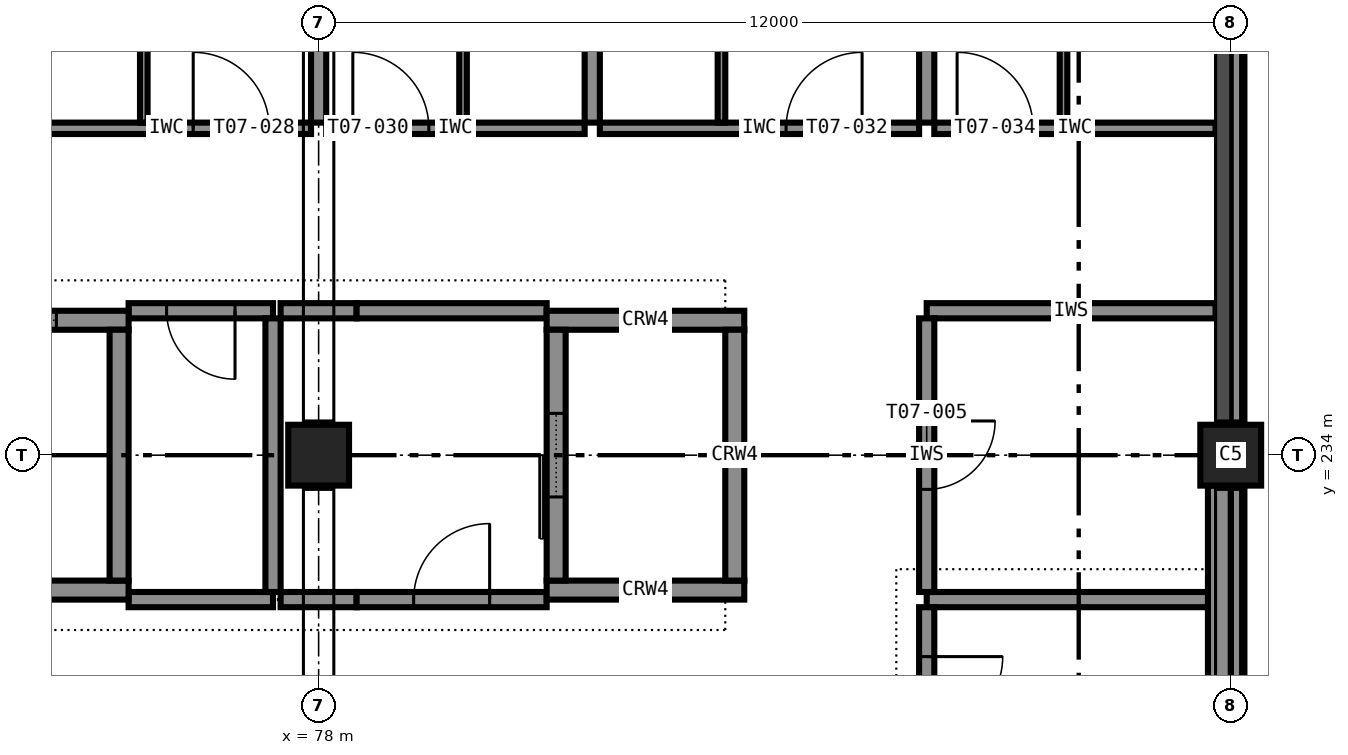
"""IFC4 building model, lengths in metres.
Left out: names, types, materials, properties, quantities, classifications, styles, units other than length and angle.
Written with IfcOpenShell. Run it as: python <this file> out.ifc"""

import sys

from ifc_helpers import new_model, si_unit, direction, frame, frame_2d, origin, origin_2d, place, context, subcontext, project, spatial, rectangle, extrude, element, fill, save


model = new_model("IFC4")
c1 = context("Model", 3, precision=1e-05, world=origin(), true_north=direction((0.0, 1.0)))
c2 = subcontext(c1, "Body", "Model", "MODEL_VIEW")
j1 = project(units=[si_unit("LENGTHUNIT", "METRE"), si_unit("PLANEANGLEUNIT", "RADIAN")], contexts=[c1])
p1 = place(None, origin())
s1 = spatial("IfcSite", under=j1, at=p1, CompositionType="ELEMENT")
p2 = place(p1, origin())
s2 = spatial("IfcBuilding", under=s1, at=p2, CompositionType="ELEMENT")
p3 = place(p2, frame((0.0, 0.0, 35.4)))
s3 = spatial("IfcBuildingStorey", under=s2, at=p3, CompositionType="ELEMENT", Elevation=35.4)
for number, where, z_axis, x_axis in (
    (1, (78.0, 234.0, 0.0), (0.0, 0.0, 1.0), (1.0, 0.0, 0.0)),
    (2, (90.0, 234.0, 0.0), (0.0, 0.0, 1.0), (1.0, 0.0, 0.0)),
):
    element("IfcColumn", number, at=place(p3, frame(where, z_axis=z_axis, x_axis=x_axis)), inside=s3, PredefinedType="COLUMN", context=c2, shape_type="SweptSolid", body=[
        extrude(rectangle(XDim=0.8, YDim=0.8, at=origin_2d()), origin(), (0.0, 0.0, 1.0), 3.6),
    ])
p4 = place(p3, frame((72.5, 232.225, 0.0), z_axis=(0.0, 0.0, 1.0), x_axis=(1.0, 0.0, 0.0)))
e3 = element("IfcWall", 3, at=p4, inside=s3, PredefinedType="SHEAR", context=c2, shape_type="SweptSolid", body=[
    extrude(rectangle(XDim=3.0, YDim=0.25, at=frame_2d((1.5, 0.0))), origin(), (0.0, 0.0, 1.0), 3.6),
])
p5 = place(p3, frame((72.5, 235.775, 0.0), z_axis=(0.0, 0.0, 1.0), x_axis=(1.0, 0.0, 0.0)))
e4 = element("IfcWall", 4, at=p5, inside=s3, PredefinedType="SHEAR", context=c2, shape_type="SweptSolid", body=[
    extrude(rectangle(XDim=3.0, YDim=0.25, at=frame_2d((1.5, 0.0))), origin(), (0.0, 0.0, 1.0), 3.6),
])
p6 = place(p5, frame((0.95, 0.0, 0.0)))
e5 = element("IfcOpeningElement", 5, at=p6, cuts=e4, PredefinedType="OPENING", context=c2, shape_type="SweptSolid", body=[
    extrude(rectangle(XDim=1.1, YDim=2.1, at=frame_2d((0.55, 1.05))), frame((0.0, 0.135, 0.0), z_axis=(0.0, -1.0, 0.0), x_axis=(1.0, 0.0, 0.0)), (0.0, 0.0, 1.0), 0.27),
])
p7 = place(p3, frame((75.375, 232.35, 0.0), z_axis=(0.0, 0.0, 1.0), x_axis=(0.0, 1.0, 0.0)))
e6 = element("IfcWall", 6, at=p7, inside=s3, PredefinedType="SHEAR", context=c2, shape_type="SweptSolid", body=[
    extrude(rectangle(XDim=3.3, YDim=0.25, at=frame_2d((1.65, 0.0))), origin(), (0.0, 0.0, 1.0), 3.6),
])
for number, where, z_axis, x_axis in (
    (7, (81.0, 232.225, 0.0), (0.0, 0.0, 1.0), (1.0, 0.0, 0.0)),
    (8, (81.0, 235.775, 0.0), (0.0, 0.0, 1.0), (1.0, 0.0, 0.0)),
):
    element("IfcWall", number, at=place(p3, frame(where, z_axis=z_axis, x_axis=x_axis)), inside=s3, PredefinedType="SHEAR", context=c2, shape_type="SweptSolid", body=[
        extrude(rectangle(XDim=2.6, YDim=0.25, at=frame_2d((1.3, 0.0))), origin(), (0.0, 0.0, 1.0), 3.6),
    ])
p8 = place(p3, frame((81.125, 232.35, 0.0), z_axis=(0.0, 0.0, 1.0), x_axis=(0.0, 1.0, 0.0)))
e9 = element("IfcWall", 9, at=p8, inside=s3, PredefinedType="SHEAR", context=c2, shape_type="SweptSolid", body=[
    extrude(rectangle(XDim=3.3, YDim=0.25, at=frame_2d((1.65, 0.0))), origin(), (0.0, 0.0, 1.0), 3.6),
])
p9 = place(p8, frame((1.1, 0.0, 0.0)))
e10 = element("IfcOpeningElement", 10, at=p9, cuts=e9, PredefinedType="OPENING", context=c2, shape_type="SweptSolid", body=[
    extrude(rectangle(XDim=1.1, YDim=2.1, at=frame_2d((0.55, 1.05))), frame((0.0, 0.135, 0.0), z_axis=(0.0, -1.0, 0.0), x_axis=(1.0, 0.0, 0.0)), (0.0, 0.0, 1.0), 0.27),
])
p10 = place(p3, frame((83.475, 232.35, 0.0), z_axis=(0.0, 0.0, 1.0), x_axis=(0.0, 1.0, 0.0)))
e11 = element("IfcWall", 11, at=p10, inside=s3, PredefinedType="SHEAR", context=c2, shape_type="SweptSolid", body=[
    extrude(rectangle(XDim=3.3, YDim=0.25, at=frame_2d((1.65, 0.0))), origin(), (0.0, 0.0, 1.0), 3.6),
])
p11 = place(p3, frame((89.85, 222.4, 0.0), z_axis=(0.0, 0.0, 1.0), x_axis=(0.0, 1.0, 0.0)))
e12 = element("IfcWall", 12, at=p11, inside=s3, PredefinedType="STANDARD", context=c2, shape_type="SweptSolid", body=[
    extrude(rectangle(XDim=11.2, YDim=0.3, at=frame_2d((5.6, 0.0))), origin(), (0.0, 0.0, 1.0), 2.6),
])
for number, where, z_axis, x_axis in (
    (13, (90.075, 222.4, 3.4), (0.0, 0.0, 1.0), (0.0, 1.0, 0.0)),
    (14, (90.075, 234.4, 3.4), (0.0, 0.0, 1.0), (0.0, 1.0, 0.0)),
):
    element("IfcWall", number, at=place(p3, frame(where, z_axis=z_axis, x_axis=x_axis)), inside=s3, PredefinedType="STANDARD", context=c2, shape_type="SweptSolid", body=[
        extrude(rectangle(XDim=11.2, YDim=0.15, at=frame_2d((5.6, 0.0))), origin(), (0.0, 0.0, 1.0), 0.2),
    ])
p12 = place(p3, frame((75.5, 232.1, 0.0), z_axis=(0.0, 0.0, 1.0), x_axis=(1.0, 0.0, 0.0)))
e15 = element("IfcWall", 15, at=p12, inside=s3, PredefinedType="PARTITIONING", context=c2, shape_type="SweptSolid", body=[
    extrude(rectangle(XDim=1.9, YDim=0.2, at=frame_2d((0.95, 0.0))), origin(), (0.0, 0.0, 1.0), 3.4),
])
p13 = place(p3, frame((77.5, 232.1, 0.0), z_axis=(0.0, 0.0, 1.0), x_axis=(1.0, 0.0, 0.0)))
e16 = element("IfcWall", 16, at=p13, inside=s3, PredefinedType="PARTITIONING", context=c2, shape_type="SweptSolid", body=[
    extrude(rectangle(XDim=1.0, YDim=0.2, at=frame_2d((0.5, 0.0))), origin(), (0.0, 0.0, 1.0), 3.4),
])
p14 = place(p3, frame((78.5, 232.1, 0.0), z_axis=(0.0, 0.0, 1.0), x_axis=(1.0, 0.0, 0.0)))
e17 = element("IfcWall", 17, at=p14, inside=s3, PredefinedType="PARTITIONING", context=c2, shape_type="SweptSolid", body=[
    extrude(rectangle(XDim=2.5, YDim=0.2, at=frame_2d((1.25, 0.0))), origin(), (0.0, 0.0, 1.0), 3.4),
])
p15 = place(p14, frame((0.75, 0.0, 0.0)))
e18 = element("IfcOpeningElement", 18, at=p15, cuts=e17, PredefinedType="OPENING", context=c2, shape_type="SweptSolid", body=[
    extrude(rectangle(XDim=1.0, YDim=2.1, at=frame_2d((0.5, 1.05))), frame((0.0, 0.11, 0.0), z_axis=(0.0, -1.0, 0.0), x_axis=(1.0, 0.0, 0.0)), (0.0, 0.0, 1.0), 0.22),
])
p16 = place(p3, frame((86.0, 232.1, 0.0), z_axis=(0.0, 0.0, 1.0), x_axis=(1.0, 0.0, 0.0)))
e19 = element("IfcWall", 19, at=p16, inside=s3, PredefinedType="PARTITIONING", context=c2, shape_type="SweptSolid", body=[
    extrude(rectangle(XDim=3.7, YDim=0.2, at=frame_2d((1.85, 0.0))), origin(), (0.0, 0.0, 1.0), 3.4),
])
p17 = place(p3, frame((77.4, 235.9, 0.0), z_axis=(0.0, 0.0, 1.0), x_axis=(-1.0, 0.0, 0.0)))
e20 = element("IfcWall", 20, at=p17, inside=s3, PredefinedType="PARTITIONING", context=c2, shape_type="SweptSolid", body=[
    extrude(rectangle(XDim=1.9, YDim=0.2, at=frame_2d((0.95, 0.0))), origin(), (0.0, 0.0, 1.0), 3.4),
])
p18 = place(p17, frame((0.5, 0.0, 0.0)))
e21 = element("IfcOpeningElement", 21, at=p18, cuts=e20, PredefinedType="OPENING", context=c2, shape_type="SweptSolid", body=[
    extrude(rectangle(XDim=0.9, YDim=2.1, at=frame_2d((0.45, 1.05))), frame((0.0, 0.11, 0.0), z_axis=(0.0, -1.0, 0.0), x_axis=(1.0, 0.0, 0.0)), (0.0, 0.0, 1.0), 0.22),
])
p19 = place(p3, frame((77.5, 235.9, 0.0), z_axis=(0.0, 0.0, 1.0), x_axis=(1.0, 0.0, 0.0)))
e22 = element("IfcWall", 22, at=p19, inside=s3, PredefinedType="PARTITIONING", context=c2, shape_type="SweptSolid", body=[
    extrude(rectangle(XDim=1.0, YDim=0.2, at=frame_2d((0.5, 0.0))), origin(), (0.0, 0.0, 1.0), 3.4),
])
p20 = place(p3, frame((78.5, 235.9, 0.0), z_axis=(0.0, 0.0, 1.0), x_axis=(1.0, 0.0, 0.0)))
e23 = element("IfcWall", 23, at=p20, inside=s3, PredefinedType="PARTITIONING", context=c2, shape_type="SweptSolid", body=[
    extrude(rectangle(XDim=2.5, YDim=0.2, at=frame_2d((1.25, 0.0))), origin(), (0.0, 0.0, 1.0), 3.4),
])
p21 = place(p3, frame((86.0, 235.9, 0.0), z_axis=(0.0, 0.0, 1.0), x_axis=(1.0, 0.0, 0.0)))
e24 = element("IfcWall", 24, at=p21, inside=s3, PredefinedType="PARTITIONING", context=c2, shape_type="SweptSolid", body=[
    extrude(rectangle(XDim=3.8, YDim=0.2, at=frame_2d((1.9, 0.0))), origin(), (0.0, 0.0, 1.0), 3.4),
])
p22 = place(p3, frame((77.4, 232.2, 0.0), z_axis=(0.0, 0.0, 1.0), x_axis=(0.0, 1.0, 0.0)))
e25 = element("IfcWall", 25, at=p22, inside=s3, PredefinedType="PARTITIONING", context=c2, shape_type="SweptSolid", body=[
    extrude(rectangle(XDim=3.6, YDim=0.2, at=frame_2d((1.8, 0.0))), origin(), (0.0, 0.0, 1.0), 3.4),
])
p23 = place(p3, frame((86.0, 235.8, 0.0), z_axis=(0.0, 0.0, 1.0), x_axis=(0.0, -1.0, 0.0)))
e26 = element("IfcWall", 26, at=p23, inside=s3, PredefinedType="PARTITIONING", context=c2, shape_type="SweptSolid", body=[
    extrude(rectangle(XDim=3.6, YDim=0.2, at=frame_2d((1.8, 0.0))), origin(), (0.0, 0.0, 1.0), 3.4),
])
p24 = place(p23, frame((1.35, 0.0, 0.0)))
e27 = element("IfcOpeningElement", 27, at=p24, cuts=e26, PredefinedType="OPENING", context=c2, shape_type="SweptSolid", body=[
    extrude(rectangle(XDim=0.9, YDim=2.1, at=frame_2d((0.45, 1.05))), frame((0.0, 0.11, 0.0), z_axis=(0.0, -1.0, 0.0), x_axis=(1.0, 0.0, 0.0)), (0.0, 0.0, 1.0), 0.22),
])
p25 = place(p3, frame((86.0, 232.0, 0.0), z_axis=(0.0, 0.0, 1.0), x_axis=(0.0, -1.0, 0.0)))
e28 = element("IfcWall", 28, at=p25, inside=s3, PredefinedType="PARTITIONING", context=c2, shape_type="SweptSolid", body=[
    extrude(rectangle(XDim=2.3, YDim=0.2, at=frame_2d((1.15, 0.0))), origin(), (0.0, 0.0, 1.0), 3.4),
])
p26 = place(p25, frame((0.65, 0.0, 0.0)))
e29 = element("IfcOpeningElement", 29, at=p26, cuts=e28, PredefinedType="OPENING", context=c2, shape_type="SweptSolid", body=[
    extrude(rectangle(XDim=1.0, YDim=2.1, at=frame_2d((0.5, 1.05))), frame((0.0, 0.11, 0.0), z_axis=(0.0, -1.0, 0.0), x_axis=(1.0, 0.0, 0.0)), (0.0, 0.0, 1.0), 0.22),
])
p27 = place(p3, frame((74.1, 238.3, 0.0), z_axis=(0.0, 0.0, 1.0), x_axis=(1.0, 0.0, 0.0)))
e30 = element("IfcWall", 30, at=p27, inside=s3, PredefinedType="PARTITIONING", context=c2, shape_type="SweptSolid", body=[
    extrude(rectangle(XDim=3.8, YDim=0.15, at=frame_2d((1.9, 0.0))), origin(), (0.0, 0.0, 1.0), 3.4),
])
p28 = place(p27, frame((2.25, 0.0, 0.0)))
e31 = element("IfcOpeningElement", 31, at=p28, cuts=e30, PredefinedType="OPENING", context=c2, shape_type="SweptSolid", body=[
    extrude(rectangle(XDim=1.0, YDim=2.1, at=frame_2d((0.5, 1.05))), frame((0.0, 0.085, 0.0), z_axis=(0.0, -1.0, 0.0), x_axis=(1.0, 0.0, 0.0)), (0.0, 0.0, 1.0), 0.17),
])
p29 = place(p3, frame((75.7, 241.25, 0.0), z_axis=(0.0, 0.0, 1.0), x_axis=(0.0, -1.0, 0.0)))
e32 = element("IfcWall", 32, at=p29, inside=s3, PredefinedType="PARTITIONING", context=c2, shape_type="SweptSolid", body=[
    extrude(rectangle(XDim=2.875, YDim=0.1, at=frame_2d((1.438, 0.0))), origin(), (0.0, 0.0, 1.0), 3.4),
])
p30 = place(p29, frame((1.038, 0.0, 0.0)))
e33 = element("IfcOpeningElement", 33, at=p30, cuts=e32, PredefinedType="OPENING", context=c2, shape_type="SweptSolid", body=[
    extrude(rectangle(XDim=0.8, YDim=2.1, at=frame_2d((0.4, 1.05))), frame((0.0, 0.06, 0.0), z_axis=(0.0, -1.0, 0.0), x_axis=(1.0, 0.0, 0.0)), (0.0, 0.0, 1.0), 0.12),
])
p31 = place(p3, frame((78.1, 238.3, 0.0), z_axis=(0.0, 0.0, 1.0), x_axis=(1.0, 0.0, 0.0)))
e34 = element("IfcWall", 34, at=p31, inside=s3, PredefinedType="PARTITIONING", context=c2, shape_type="SweptSolid", body=[
    extrude(rectangle(XDim=3.4, YDim=0.15, at=frame_2d((1.7, 0.0))), origin(), (0.0, 0.0, 1.0), 3.4),
])
p32 = place(p31, frame((0.35, 0.0, 0.0)))
e35 = element("IfcOpeningElement", 35, at=p32, cuts=e34, PredefinedType="OPENING", context=c2, shape_type="SweptSolid", body=[
    extrude(rectangle(XDim=1.0, YDim=2.1, at=frame_2d((0.5, 1.05))), frame((0.0, 0.085, 0.0), z_axis=(0.0, -1.0, 0.0), x_axis=(1.0, 0.0, 0.0)), (0.0, 0.0, 1.0), 0.17),
])
p33 = place(p3, frame((79.9, 238.375, 0.0), z_axis=(0.0, 0.0, 1.0), x_axis=(0.0, 1.0, 0.0)))
e36 = element("IfcWall", 36, at=p33, inside=s3, PredefinedType="PARTITIONING", context=c2, shape_type="SweptSolid", body=[
    extrude(rectangle(XDim=2.875, YDim=0.1, at=frame_2d((1.438, 0.0))), origin(), (0.0, 0.0, 1.0), 3.4),
])
p34 = place(p33, frame((1.038, 0.0, 0.0)))
e37 = element("IfcOpeningElement", 37, at=p34, cuts=e36, PredefinedType="OPENING", context=c2, shape_type="SweptSolid", body=[
    extrude(rectangle(XDim=0.8, YDim=2.1, at=frame_2d((0.4, 1.05))), frame((0.0, 0.06, 0.0), z_axis=(0.0, -1.0, 0.0), x_axis=(1.0, 0.0, 0.0)), (0.0, 0.0, 1.0), 0.12),
])
p35 = place(p3, frame((81.7, 238.3, 0.0), z_axis=(0.0, 0.0, 1.0), x_axis=(1.0, 0.0, 0.0)))
e38 = element("IfcWall", 38, at=p35, inside=s3, PredefinedType="PARTITIONING", context=c2, shape_type="SweptSolid", body=[
    extrude(rectangle(XDim=4.2, YDim=0.15, at=frame_2d((2.1, 0.0))), origin(), (0.0, 0.0, 1.0), 3.4),
])
p36 = place(p35, frame((2.45, 0.0, 0.0)))
e39 = element("IfcOpeningElement", 39, at=p36, cuts=e38, PredefinedType="OPENING", context=c2, shape_type="SweptSolid", body=[
    extrude(rectangle(XDim=1.0, YDim=2.1, at=frame_2d((0.5, 1.05))), frame((0.0, 0.085, 0.0), z_axis=(0.0, -1.0, 0.0), x_axis=(1.0, 0.0, 0.0)), (0.0, 0.0, 1.0), 0.17),
])
p37 = place(p3, frame((83.3, 241.25, 0.0), z_axis=(0.0, 0.0, 1.0), x_axis=(0.0, -1.0, 0.0)))
e40 = element("IfcWall", 40, at=p37, inside=s3, PredefinedType="PARTITIONING", context=c2, shape_type="SweptSolid", body=[
    extrude(rectangle(XDim=2.875, YDim=0.1, at=frame_2d((1.438, 0.0))), origin(), (0.0, 0.0, 1.0), 3.4),
])
p38 = place(p37, frame((1.038, 0.0, 0.0)))
e41 = element("IfcOpeningElement", 41, at=p38, cuts=e40, PredefinedType="OPENING", context=c2, shape_type="SweptSolid", body=[
    extrude(rectangle(XDim=0.8, YDim=2.1, at=frame_2d((0.4, 1.05))), frame((0.0, 0.06, 0.0), z_axis=(0.0, -1.0, 0.0), x_axis=(1.0, 0.0, 0.0)), (0.0, 0.0, 1.0), 0.12),
])
p39 = place(p3, frame((86.1, 238.3, 0.0), z_axis=(0.0, 0.0, 1.0), x_axis=(1.0, 0.0, 0.0)))
e42 = element("IfcWall", 42, at=p39, inside=s3, PredefinedType="PARTITIONING", context=c2, shape_type="SweptSolid", body=[
    extrude(rectangle(XDim=3.7, YDim=0.15, at=frame_2d((1.85, 0.0))), origin(), (0.0, 0.0, 1.0), 3.4),
])
p40 = place(p39, frame((0.3, 0.0, 0.0)))
e43 = element("IfcOpeningElement", 43, at=p40, cuts=e42, PredefinedType="OPENING", context=c2, shape_type="SweptSolid", body=[
    extrude(rectangle(XDim=1.0, YDim=2.1, at=frame_2d((0.5, 1.05))), frame((0.0, 0.085, 0.0), z_axis=(0.0, -1.0, 0.0), x_axis=(1.0, 0.0, 0.0)), (0.0, 0.0, 1.0), 0.17),
])
p41 = place(p3, frame((87.8, 238.375, 0.0), z_axis=(0.0, 0.0, 1.0), x_axis=(0.0, 1.0, 0.0)))
e44 = element("IfcWall", 44, at=p41, inside=s3, PredefinedType="PARTITIONING", context=c2, shape_type="SweptSolid", body=[
    extrude(rectangle(XDim=2.875, YDim=0.1, at=frame_2d((1.438, 0.0))), origin(), (0.0, 0.0, 1.0), 3.4),
])
p42 = place(p41, frame((1.038, 0.0, 0.0)))
e45 = element("IfcOpeningElement", 45, at=p42, cuts=e44, PredefinedType="OPENING", context=c2, shape_type="SweptSolid", body=[
    extrude(rectangle(XDim=0.8, YDim=2.1, at=frame_2d((0.4, 1.05))), frame((0.0, 0.06, 0.0), z_axis=(0.0, -1.0, 0.0), x_axis=(1.0, 0.0, 0.0)), (0.0, 0.0, 1.0), 0.12),
])
p43 = place(p3, frame((78.0, 245.6, 0.0), z_axis=(0.0, 0.0, 1.0), x_axis=(0.0, -1.0, 0.0)))
e46 = element("IfcWall", 46, at=p43, inside=s3, PredefinedType="PARTITIONING", context=c2, shape_type="SweptSolid", body=[
    extrude(rectangle(XDim=7.225, YDim=0.2, at=frame_2d((3.613, 0.0))), origin(), (0.0, 0.0, 1.0), 2.6),
])
for number, where, z_axis, x_axis in (
    (47, (81.6, 245.7, 0.0), (0.0, 0.0, 1.0), (0.0, -1.0, 0.0)),
    (48, (86.0, 245.7, 0.0), (0.0, 0.0, 1.0), (0.0, -1.0, 0.0)),
):
    element("IfcWall", number, at=place(p3, frame(where, z_axis=z_axis, x_axis=x_axis)), inside=s3, PredefinedType="PARTITIONING", context=c2, shape_type="SweptSolid", body=[
        extrude(rectangle(XDim=7.325, YDim=0.2, at=frame_2d((3.663, 0.0))), origin(), (0.0, 0.0, 1.0), 3.4),
    ])
p44 = place(p18, origin())
e49 = element("IfcDoor", 49, at=p44, inside=s3, OperationType="SINGLE_SWING_LEFT", PredefinedType="DOOR", context=c2, shape_type="SweptSolid", body=[
    extrude(rectangle(XDim=0.9, YDim=2.1, at=frame_2d((0.45, 1.05))), frame((0.0, 0.025, 0.0), z_axis=(0.0, -1.0, 0.0), x_axis=(1.0, 0.0, 0.0)), (0.0, 0.0, 1.0), 0.05),
])
fill(e21, e49)
p45 = place(p15, origin())
e50 = element("IfcDoor", 50, at=p45, inside=s3, OperationType="SINGLE_SWING_RIGHT", PredefinedType="DOOR", context=c2, shape_type="SweptSolid", body=[
    extrude(rectangle(XDim=1.0, YDim=2.1, at=frame_2d((0.5, 1.05))), frame((0.0, 0.025, 0.0), z_axis=(0.0, -1.0, 0.0), x_axis=(1.0, 0.0, 0.0)), (0.0, 0.0, 1.0), 0.05),
])
fill(e18, e50)
p46 = place(p24, origin())
e51 = element("IfcDoor", 51, at=p46, inside=s3, OperationType="SINGLE_SWING_LEFT", PredefinedType="DOOR", context=c2, shape_type="SweptSolid", body=[
    extrude(rectangle(XDim=0.9, YDim=2.1, at=frame_2d((0.45, 1.05))), frame((0.0, 0.025, 0.0), z_axis=(0.0, -1.0, 0.0), x_axis=(1.0, 0.0, 0.0)), (0.0, 0.0, 1.0), 0.05),
])
fill(e27, e51)
p47 = place(p26, origin())
e52 = element("IfcDoor", 52, at=p47, inside=s3, OperationType="SINGLE_SWING_LEFT", PredefinedType="DOOR", context=c2, shape_type="SweptSolid", body=[
    extrude(rectangle(XDim=1.0, YDim=2.1, at=frame_2d((0.5, 1.05))), frame((0.0, 0.025, 0.0), z_axis=(0.0, -1.0, 0.0), x_axis=(1.0, 0.0, 0.0)), (0.0, 0.0, 1.0), 0.05),
])
fill(e29, e52)
p48 = place(p28, origin())
e53 = element("IfcDoor", 53, at=p48, inside=s3, OperationType="SINGLE_SWING_LEFT", PredefinedType="DOOR", context=c2, shape_type="SweptSolid", body=[
    extrude(rectangle(XDim=1.0, YDim=2.1, at=frame_2d((0.5, 1.05))), frame((0.0, 0.025, 0.0), z_axis=(0.0, -1.0, 0.0), x_axis=(1.0, 0.0, 0.0)), (0.0, 0.0, 1.0), 0.05),
])
fill(e31, e53)
p49 = place(p32, origin())
e54 = element("IfcDoor", 54, at=p49, inside=s3, OperationType="SINGLE_SWING_LEFT", PredefinedType="DOOR", context=c2, shape_type="SweptSolid", body=[
    extrude(rectangle(XDim=1.0, YDim=2.1, at=frame_2d((0.5, 1.05))), frame((0.0, 0.025, 0.0), z_axis=(0.0, -1.0, 0.0), x_axis=(1.0, 0.0, 0.0)), (0.0, 0.0, 1.0), 0.05),
])
fill(e35, e54)
p50 = place(p36, origin())
e55 = element("IfcDoor", 55, at=p50, inside=s3, OperationType="SINGLE_SWING_RIGHT", PredefinedType="DOOR", context=c2, shape_type="SweptSolid", body=[
    extrude(rectangle(XDim=1.0, YDim=2.1, at=frame_2d((0.5, 1.05))), frame((0.0, 0.025, 0.0), z_axis=(0.0, -1.0, 0.0), x_axis=(1.0, 0.0, 0.0)), (0.0, 0.0, 1.0), 0.05),
])
fill(e39, e55)
p51 = place(p40, origin())
e56 = element("IfcDoor", 56, at=p51, inside=s3, OperationType="SINGLE_SWING_LEFT", PredefinedType="DOOR", context=c2, shape_type="SweptSolid", body=[
    extrude(rectangle(XDim=1.0, YDim=2.1, at=frame_2d((0.5, 1.05))), frame((0.0, 0.025, 0.0), z_axis=(0.0, -1.0, 0.0), x_axis=(1.0, 0.0, 0.0)), (0.0, 0.0, 1.0), 0.05),
])
fill(e43, e56)
p52 = place(p6, origin())
e57 = element("IfcDoor", 57, at=p52, inside=s3, OperationType="SLIDING_TO_LEFT", PredefinedType="DOOR", context=c2, shape_type="SweptSolid", body=[
    extrude(rectangle(XDim=1.1, YDim=2.1, at=frame_2d((0.55, 1.05))), frame((0.0, 0.025, 0.0), z_axis=(0.0, -1.0, 0.0), x_axis=(1.0, 0.0, 0.0)), (0.0, 0.0, 1.0), 0.05),
])
fill(e5, e57)
p53 = place(p9, origin())
e58 = element("IfcDoor", 58, at=p53, inside=s3, OperationType="SLIDING_TO_LEFT", PredefinedType="DOOR", context=c2, shape_type="SweptSolid", body=[
    extrude(rectangle(XDim=1.1, YDim=2.1, at=frame_2d((0.55, 1.05))), frame((0.0, 0.025, 0.0), z_axis=(0.0, -1.0, 0.0), x_axis=(1.0, 0.0, 0.0)), (0.0, 0.0, 1.0), 0.05),
])
fill(e10, e58)
save(model, sys.argv[1])
